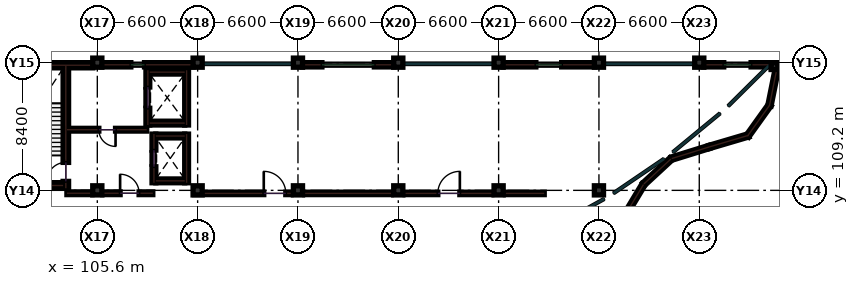
"""IFC4 building model, lengths in metres.
Left out: names, types, materials, properties, quantities, classifications, styles, units other than length and angle.
Written with IfcOpenShell. Run it as: python <this file> out.ifc"""

import sys

from ifc_helpers import new_model, si_unit, direction, frame, frame_2d, origin, origin_2d, place, context, subcontext, project, spatial, rectangle, extrude, element, fill, save


model = new_model("IFC4")
c1 = context("Model", 3, precision=1e-05, world=origin(), true_north=direction((0.0, 1.0)))
c2 = subcontext(c1, "Body", "Model", "MODEL_VIEW")
j1 = project(units=[si_unit("LENGTHUNIT", "METRE"), si_unit("PLANEANGLEUNIT", "RADIAN")], contexts=[c1])
p1 = place(None, origin())
s1 = spatial("IfcSite", under=j1, at=p1, CompositionType="ELEMENT")
p2 = place(p1, origin())
s2 = spatial("IfcBuilding", under=s1, at=p2, CompositionType="ELEMENT")
p3 = place(p2, frame((0.0, 0.0, 14.4)))
s3 = spatial("IfcBuildingStorey", under=s2, at=p3, CompositionType="ELEMENT", Elevation=14.4)
for number, where, z_axis, x_axis in (
    (1, (105.6, 109.2, 0.0), (0.0, 0.0, 1.0), (1.0, 0.0, 0.0)),
    (2, (105.6, 117.6, 0.0), (0.0, 0.0, 1.0), (1.0, 0.0, 0.0)),
    (3, (112.2, 109.2, 0.0), (0.0, 0.0, 1.0), (1.0, 0.0, 0.0)),
    (4, (112.2, 117.6, 0.0), (0.0, 0.0, 1.0), (1.0, 0.0, 0.0)),
    (5, (118.8, 109.2, 0.0), (0.0, 0.0, 1.0), (1.0, 0.0, 0.0)),
    (6, (118.8, 117.6, 0.0), (0.0, 0.0, 1.0), (1.0, 0.0, 0.0)),
    (7, (125.4, 109.2, 0.0), (0.0, 0.0, 1.0), (1.0, 0.0, 0.0)),
    (8, (125.4, 117.6, 0.0), (0.0, 0.0, 1.0), (1.0, 0.0, 0.0)),
    (9, (132.0, 109.2, 0.0), (0.0, 0.0, 1.0), (1.0, 0.0, 0.0)),
    (10, (132.0, 117.6, 0.0), (0.0, 0.0, 1.0), (1.0, 0.0, 0.0)),
    (11, (138.6, 109.2, 0.0), (0.0, 0.0, 1.0), (1.0, 0.0, 0.0)),
    (12, (138.6, 117.6, 0.0), (0.0, 0.0, 1.0), (1.0, 0.0, 0.0)),
    (13, (145.2, 117.6, 0.0), (0.0, 0.0, 1.0), (1.0, 0.0, 0.0)),
):
    element("IfcColumn", number, at=place(p3, frame(where, z_axis=z_axis, x_axis=x_axis)), inside=s3, PredefinedType="COLUMN", context=c2, shape_type="SweptSolid", body=[
        extrude(rectangle(XDim=0.6, YDim=0.6, at=origin_2d()), origin(), (0.0, 0.0, 1.0), 4.2),
    ])
p4 = place(p3, frame((150.15, 117.375, 0.0), z_axis=(0.0, 0.0, 1.0), x_axis=(1.0, 0.0, 0.0)))
e14 = element("IfcColumn", 14, at=p4, inside=s3, PredefinedType="COLUMN", context=c2, shape_type="SweptSolid", body=[
    extrude(rectangle(XDim=0.45, YDim=0.45, at=origin_2d()), origin(), (0.0, 0.0, 1.0), 4.2),
])
p5 = place(p3, frame((112.0, 109.0, 0.0), z_axis=(0.0, 0.0, 1.0), x_axis=(1.0, 0.0, 0.0)))
e15 = element("IfcWall", 15, at=p5, inside=s3, PredefinedType="PARTITIONING", context=c2, shape_type="SweptSolid", body=[
    extrude(rectangle(XDim=6.35, YDim=0.16, at=frame_2d((3.175, 0.0))), origin(), (0.0, 0.0, 1.0), 3.175),
])
p6 = place(p5, frame((4.55, 0.0, 0.0)))
e16 = element("IfcOpeningElement", 16, at=p6, cuts=e15, PredefinedType="OPENING", context=c2, shape_type="SweptSolid", body=[
    extrude(rectangle(XDim=1.45, YDim=2.25, at=frame_2d((0.725, 1.125))), frame((0.0, 0.09, 0.0), z_axis=(0.0, -1.0, 0.0), x_axis=(1.0, 0.0, 0.0)), (0.0, 0.0, 1.0), 0.18),
])
p7 = place(p3, frame((119.25, 109.0, 0.0), z_axis=(0.0, 0.0, 1.0), x_axis=(1.0, 0.0, 0.0)))
e17 = element("IfcWall", 17, at=p7, inside=s3, PredefinedType="PARTITIONING", context=c2, shape_type="SweptSolid", body=[
    extrude(rectangle(XDim=5.7, YDim=0.16, at=frame_2d((2.85, 0.0))), origin(), (0.0, 0.0, 1.0), 3.175),
])
p8 = place(p3, frame((125.85, 109.0, 0.0), z_axis=(0.0, 0.0, 1.0), x_axis=(1.0, 0.0, 0.0)))
e18 = element("IfcWall", 18, at=p8, inside=s3, PredefinedType="PARTITIONING", context=c2, shape_type="SweptSolid", body=[
    extrude(rectangle(XDim=5.7, YDim=0.16, at=frame_2d((2.85, 0.0))), origin(), (0.0, 0.0, 1.0), 3.175),
])
p9 = place(p8, frame((2.15, 0.0, 0.0)))
e19 = element("IfcOpeningElement", 19, at=p9, cuts=e18, PredefinedType="OPENING", context=c2, shape_type="SweptSolid", body=[
    extrude(rectangle(XDim=1.45, YDim=2.25, at=frame_2d((0.725, 1.125))), frame((0.0, 0.09, 0.0), z_axis=(0.0, -1.0, 0.0), x_axis=(1.0, 0.0, 0.0)), (0.0, 0.0, 1.0), 0.18),
])
p10 = place(p3, frame((132.45, 109.0, 0.0), z_axis=(0.0, 0.0, 1.0), x_axis=(1.0, 0.0, 0.0)))
e20 = element("IfcWall", 20, at=p10, inside=s3, PredefinedType="PARTITIONING", context=c2, shape_type="SweptSolid", body=[
    extrude(rectangle(XDim=2.55, YDim=0.16, at=frame_2d((1.275, 0.0))), origin(), (0.0, 0.0, 1.0), 3.175),
])
p11 = place(p3, frame((105.305, 117.43, 0.0), z_axis=(0.0, 0.0, 1.0), x_axis=(-1.0, 0.0, 0.0)))
e21 = element("IfcWall", 21, at=p11, inside=s3, PredefinedType="SHEAR", context=c2, shape_type="SweptSolid", body=[
    extrude(rectangle(XDim=6.01, YDim=0.34, at=frame_2d((3.005, 0.0))), origin(), (0.0, 0.0, 1.0), 3.94),
])
p12 = place(p3, frame((111.905, 117.46, 0.0), z_axis=(0.0, 0.0, 1.0), x_axis=(-1.0, 0.0, 0.0)))
e22 = element("IfcWall", 22, at=p12, inside=s3, PredefinedType="SOLIDWALL", context=c2, shape_type="SweptSolid", body=[
    extrude(rectangle(XDim=6.01, YDim=0.28, at=frame_2d((3.005, 0.0))), origin(), (0.0, 0.0, 1.0), 3.325),
])
p13 = place(p12, frame((3.2, 0.0, 0.95)))
e23 = element("IfcOpeningElement", 23, at=p13, cuts=e22, PredefinedType="OPENING", context=c2, shape_type="SweptSolid", body=[
    extrude(rectangle(XDim=0.9, YDim=1.4, at=frame_2d((0.45, 0.7))), frame((0.0, 0.15, 0.0), z_axis=(0.0, -1.0, 0.0), x_axis=(1.0, 0.0, 0.0)), (0.0, 0.0, 1.0), 0.3),
])
p14 = place(p3, frame((125.105, 117.46, 0.0), z_axis=(0.0, 0.0, 1.0), x_axis=(-1.0, 0.0, 0.0)))
e24 = element("IfcWall", 24, at=p14, inside=s3, PredefinedType="SOLIDWALL", context=c2, shape_type="SweptSolid", body=[
    extrude(rectangle(XDim=6.01, YDim=0.28, at=frame_2d((3.005, 0.0))), origin(), (0.0, 0.0, 1.0), 3.325),
])
p15 = place(p14, frame((1.28, 0.0, 0.95)))
e25 = element("IfcOpeningElement", 25, at=p15, cuts=e24, PredefinedType="OPENING", context=c2, shape_type="SweptSolid", body=[
    extrude(rectangle(XDim=3.45, YDim=1.7, at=frame_2d((1.725, 0.85))), frame((0.0, 0.15, 0.0), z_axis=(0.0, -1.0, 0.0), x_axis=(1.0, 0.0, 0.0)), (0.0, 0.0, 1.0), 0.3),
])
p16 = place(p3, frame((138.305, 117.46, 0.0), z_axis=(0.0, 0.0, 1.0), x_axis=(-1.0, 0.0, 0.0)))
e26 = element("IfcWall", 26, at=p16, inside=s3, PredefinedType="SOLIDWALL", context=c2, shape_type="SweptSolid", body=[
    extrude(rectangle(XDim=6.01, YDim=0.28, at=frame_2d((3.005, 0.0))), origin(), (0.0, 0.0, 1.0), 3.325),
])
p17 = place(p16, frame((2.155, 0.0, 0.95)))
e27 = element("IfcOpeningElement", 27, at=p17, cuts=e26, PredefinedType="OPENING", context=c2, shape_type="SweptSolid", body=[
    extrude(rectangle(XDim=1.7, YDim=1.95, at=frame_2d((0.85, 0.975))), frame((0.0, 0.15, 0.0), z_axis=(0.0, -1.0, 0.0), x_axis=(1.0, 0.0, 0.0)), (0.0, 0.0, 1.0), 0.3),
])
p18 = place(p3, frame((140.135, 107.265, 0.0), z_axis=(0.0, 0.0, 1.0), x_axis=(0.515304519221, 0.857007148436, 0.0)))
e28 = element("IfcWall", 28, at=p18, inside=s3, PredefinedType="SOLIDWALL", context=c2, shape_type="SweptSolid", body=[
    extrude(rectangle(XDim=2.707, YDim=0.22, at=frame_2d((1.354, 0.0))), origin(), (0.0, 0.0, 1.0), 1.45),
])
p19 = place(p3, frame((141.555, 109.62, 0.0), z_axis=(0.0, 0.0, 1.0), x_axis=(0.734536145401, 0.678569562462, 0.0)))
e29 = element("IfcWall", 29, at=p19, inside=s3, PredefinedType="SOLIDWALL", context=c2, shape_type="SweptSolid", body=[
    extrude(rectangle(XDim=2.417, YDim=0.22, at=frame_2d((1.208, 0.0))), origin(), (0.0, 0.0, 1.0), 1.45),
])
p20 = place(p3, frame((143.385, 111.29, 0.0), z_axis=(0.0, 0.0, 1.0), x_axis=(0.955244606325, 0.29581707538, 0.0)))
e30 = element("IfcWall", 30, at=p20, inside=s3, PredefinedType="SOLIDWALL", context=c2, shape_type="SweptSolid", body=[
    extrude(rectangle(XDim=2.586, YDim=0.22, at=frame_2d((1.293, 0.0))), origin(), (0.0, 0.0, 1.0), 1.45),
])
p21 = place(p3, frame((145.855, 112.055, 0.0), z_axis=(0.0, 0.0, 1.0), x_axis=(0.959029431028, 0.283306460255, 0.0)))
e31 = element("IfcWall", 31, at=p21, inside=s3, PredefinedType="SOLIDWALL", context=c2, shape_type="SweptSolid", body=[
    extrude(rectangle(XDim=2.701, YDim=0.22, at=frame_2d((1.35, 0.0))), origin(), (0.0, 0.0, 1.0), 1.45),
])
p22 = place(p3, frame((148.37, 112.765, 0.0), z_axis=(0.0, 0.0, 1.0), x_axis=(0.582720336681, 0.812672756537, 0.0)))
e32 = element("IfcWall", 32, at=p22, inside=s3, PredefinedType="SOLIDWALL", context=c2, shape_type="SweptSolid", body=[
    extrude(rectangle(XDim=2.523, YDim=0.22, at=frame_2d((1.261, 0.0))), origin(), (0.0, 0.0, 1.0), 1.45),
])
p23 = place(p3, frame((149.815, 114.76, 0.0), z_axis=(0.0, 0.0, 1.0), x_axis=(0.19684474065, 0.98043467303, 0.0)))
e33 = element("IfcWall", 33, at=p23, inside=s3, PredefinedType="SOLIDWALL", context=c2, shape_type="SweptSolid", body=[
    extrude(rectangle(XDim=2.642, YDim=0.22, at=frame_2d((1.321, 0.0))), origin(), (0.0, 0.0, 1.0), 1.45),
])
p24 = place(p3, frame((149.93, 117.46, 0.0), z_axis=(0.0, 0.0, 1.0), x_axis=(-1.0, 0.0, 0.0)))
e34 = element("IfcWall", 34, at=p24, inside=s3, PredefinedType="SOLIDWALL", context=c2, shape_type="SweptSolid", body=[
    extrude(rectangle(XDim=4.435, YDim=0.28, at=frame_2d((2.217, 0.0))), origin(), (0.0, 0.0, 1.0), 3.325),
])
p25 = place(p24, frame((1.32, 0.0, 0.95)))
e35 = element("IfcOpeningElement", 35, at=p25, cuts=e34, PredefinedType="OPENING", context=c2, shape_type="SweptSolid", body=[
    extrude(rectangle(XDim=1.8, YDim=1.6, at=frame_2d((0.9, 0.8))), frame((0.0, 0.15, 0.0), z_axis=(0.0, -1.0, 0.0), x_axis=(1.0, 0.0, 0.0)), (0.0, 0.0, 1.0), 0.3),
])
p26 = place(p3, frame((103.53, 109.34, 0.0), z_axis=(0.0, 0.0, 1.0), x_axis=(0.0, 1.0, 0.0)))
e36 = element("IfcWall", 36, at=p26, inside=s3, PredefinedType="SHEAR", context=c2, shape_type="SweptSolid", body=[
    extrude(rectangle(XDim=8.09, YDim=0.36, at=frame_2d((4.045, 0.0))), origin(), (0.0, 0.0, 1.0), 3.94),
])
p27 = place(p26, frame((0.45, 0.0, 0.0)))
e37 = element("IfcOpeningElement", 37, at=p27, cuts=e36, PredefinedType="OPENING", context=c2, shape_type="SweptSolid", body=[
    extrude(rectangle(XDim=1.25, YDim=2.15, at=frame_2d((0.625, 1.075))), frame((0.0, 0.19, 0.0), z_axis=(0.0, -1.0, 0.0), x_axis=(1.0, 0.0, 0.0)), (0.0, 0.0, 1.0), 0.38),
])
p28 = place(p3, frame((99.55, 109.52, 0.0), z_axis=(0.0, 0.0, 1.0), x_axis=(1.0, 0.0, 0.0)))
e38 = element("IfcWall", 38, at=p28, inside=s3, PredefinedType="SHEAR", context=c2, shape_type="SweptSolid", body=[
    extrude(rectangle(XDim=3.8, YDim=0.36, at=frame_2d((1.9, 0.0))), origin(), (0.0, 0.0, 1.0), 3.94),
])
p29 = place(p3, frame((109.325, 109.7, 0.0), z_axis=(0.0, 0.0, 1.0), x_axis=(0.0, 1.0, 0.0)))
e39 = element("IfcWall", 39, at=p29, inside=s3, PredefinedType="SHEAR", context=c2, shape_type="SweptSolid", body=[
    extrude(rectangle(XDim=3.2, YDim=0.25, at=frame_2d((1.6, 0.0))), origin(), (0.0, 0.0, 1.0), 3.94),
])
p30 = place(p29, frame((1.05, 0.0, 0.0)))
e40 = element("IfcOpeningElement", 40, at=p30, cuts=e39, PredefinedType="OPENING", context=c2, shape_type="SweptSolid", body=[
    extrude(rectangle(XDim=1.1, YDim=2.15, at=frame_2d((0.55, 1.075))), frame((0.0, 0.135, 0.0), z_axis=(0.0, -1.0, 0.0), x_axis=(1.0, 0.0, 0.0)), (0.0, 0.0, 1.0), 0.27),
])
p31 = place(p3, frame((111.475, 109.7, 0.0), z_axis=(0.0, 0.0, 1.0), x_axis=(0.0, 1.0, 0.0)))
e41 = element("IfcWall", 41, at=p31, inside=s3, PredefinedType="SHEAR", context=c2, shape_type="SweptSolid", body=[
    extrude(rectangle(XDim=3.2, YDim=0.25, at=frame_2d((1.6, 0.0))), origin(), (0.0, 0.0, 1.0), 3.94),
])
for number, where, z_axis, x_axis in (
    (42, (109.45, 109.825, 0.0), (0.0, 0.0, 1.0), (1.0, 0.0, 0.0)),
    (43, (109.45, 112.775, 0.0), (0.0, 0.0, 1.0), (1.0, 0.0, 0.0)),
):
    element("IfcWall", number, at=place(p3, frame(where, z_axis=z_axis, x_axis=x_axis)), inside=s3, PredefinedType="SHEAR", context=c2, shape_type="SweptSolid", body=[
        extrude(rectangle(XDim=1.9, YDim=0.25, at=frame_2d((0.95, 0.0))), origin(), (0.0, 0.0, 1.0), 3.94),
    ])
p32 = place(p3, frame((108.925, 113.5, 0.0), z_axis=(0.0, 0.0, 1.0), x_axis=(0.0, 1.0, 0.0)))
e44 = element("IfcWall", 44, at=p32, inside=s3, PredefinedType="SHEAR", context=c2, shape_type="SweptSolid", body=[
    extrude(rectangle(XDim=3.6, YDim=0.25, at=frame_2d((1.8, 0.0))), origin(), (0.0, 0.0, 1.0), 3.94),
])
p33 = place(p32, frame((1.1, 0.0, 0.0)))
e45 = element("IfcOpeningElement", 45, at=p33, cuts=e44, PredefinedType="OPENING", context=c2, shape_type="SweptSolid", body=[
    extrude(rectangle(XDim=1.4, YDim=2.2, at=frame_2d((0.7, 1.1))), frame((0.0, 0.135, 0.0), z_axis=(0.0, -1.0, 0.0), x_axis=(1.0, 0.0, 0.0)), (0.0, 0.0, 1.0), 0.27),
])
p34 = place(p3, frame((111.475, 113.5, 0.0), z_axis=(0.0, 0.0, 1.0), x_axis=(0.0, 1.0, 0.0)))
e46 = element("IfcWall", 46, at=p34, inside=s3, PredefinedType="SHEAR", context=c2, shape_type="SweptSolid", body=[
    extrude(rectangle(XDim=3.6, YDim=0.25, at=frame_2d((1.8, 0.0))), origin(), (0.0, 0.0, 1.0), 3.94),
])
for number, where, z_axis, x_axis in (
    (47, (109.05, 113.625, 0.0), (0.0, 0.0, 1.0), (1.0, 0.0, 0.0)),
    (48, (109.05, 116.975, 0.0), (0.0, 0.0, 1.0), (1.0, 0.0, 0.0)),
):
    element("IfcWall", number, at=place(p3, frame(where, z_axis=z_axis, x_axis=x_axis)), inside=s3, PredefinedType="SHEAR", context=c2, shape_type="SweptSolid", body=[
        extrude(rectangle(XDim=2.3, YDim=0.25, at=frame_2d((1.15, 0.0))), origin(), (0.0, 0.0, 1.0), 3.94),
    ])
p35 = place(p3, frame((103.6, 109.01, 0.0), z_axis=(0.0, 0.0, 1.0), x_axis=(1.0, 0.0, 0.0)))
e49 = element("IfcWall", 49, at=p35, inside=s3, PredefinedType="SOLIDWALL", context=c2, shape_type="SweptSolid", body=[
    extrude(rectangle(XDim=1.65, YDim=0.18, at=frame_2d((0.825, 0.0))), origin(), (0.0, 0.0, 1.0), 3.175),
])
p36 = place(p3, frame((105.95, 109.01, 0.0), z_axis=(0.0, 0.0, 1.0), x_axis=(1.0, 0.0, 0.0)))
e50 = element("IfcWall", 50, at=p36, inside=s3, PredefinedType="SOLIDWALL", context=c2, shape_type="SweptSolid", body=[
    extrude(rectangle(XDim=3.3, YDim=0.18, at=frame_2d((1.65, 0.0))), origin(), (0.0, 0.0, 1.0), 3.175),
])
p37 = place(p36, frame((1.15, 0.0, 0.0)))
e51 = element("IfcOpeningElement", 51, at=p37, cuts=e50, PredefinedType="OPENING", context=c2, shape_type="SweptSolid", body=[
    extrude(rectangle(XDim=1.25, YDim=2.15, at=frame_2d((0.625, 1.075))), frame((0.0, 0.1, 0.0), z_axis=(0.0, -1.0, 0.0), x_axis=(1.0, 0.0, 0.0)), (0.0, 0.0, 1.0), 0.2),
])
p38 = place(p3, frame((103.6, 113.19, 0.0), z_axis=(0.0, 0.0, 1.0), x_axis=(1.0, 0.0, 0.0)))
e52 = element("IfcWall", 52, at=p38, inside=s3, PredefinedType="SOLIDWALL", context=c2, shape_type="SweptSolid", body=[
    extrude(rectangle(XDim=5.25, YDim=0.18, at=frame_2d((2.625, 0.0))), origin(), (0.0, 0.0, 1.0), 3.94),
])
p39 = place(p38, frame((2.1, 0.0, 0.0)))
e53 = element("IfcOpeningElement", 53, at=p39, cuts=e52, PredefinedType="OPENING", context=c2, shape_type="SweptSolid", body=[
    extrude(rectangle(XDim=1.1, YDim=2.15, at=frame_2d((0.55, 1.075))), frame((0.0, 0.1, 0.0), z_axis=(0.0, -1.0, 0.0), x_axis=(1.0, 0.0, 0.0)), (0.0, 0.0, 1.0), 0.2),
])
p40 = place(p6, origin())
e54 = element("IfcDoor", 54, at=p40, inside=s3, OperationType="SINGLE_SWING_LEFT", PredefinedType="DOOR", context=c2, shape_type="SweptSolid", body=[
    extrude(rectangle(XDim=1.45, YDim=2.25, at=frame_2d((0.725, 1.125))), frame((0.0, 0.025, 0.0), z_axis=(0.0, -1.0, 0.0), x_axis=(1.0, 0.0, 0.0)), (0.0, 0.0, 1.0), 0.05),
])
fill(e16, e54)
p41 = place(p9, origin())
e55 = element("IfcDoor", 55, at=p41, inside=s3, OperationType="SINGLE_SWING_RIGHT", PredefinedType="DOOR", context=c2, shape_type="SweptSolid", body=[
    extrude(rectangle(XDim=1.45, YDim=2.25, at=frame_2d((0.725, 1.125))), frame((0.0, 0.025, 0.0), z_axis=(0.0, -1.0, 0.0), x_axis=(1.0, 0.0, 0.0)), (0.0, 0.0, 1.0), 0.05),
])
fill(e19, e55)
p42 = place(p13, origin())
e56 = element("IfcWindow", 56, at=p42, inside=s3, PartitioningType="SINGLE_PANEL", PredefinedType="WINDOW", context=c2, shape_type="SweptSolid", body=[
    extrude(rectangle(XDim=0.9, YDim=1.4, at=frame_2d((0.45, 0.7))), frame((0.0, 0.03, 0.0), z_axis=(0.0, -1.0, 0.0), x_axis=(1.0, 0.0, 0.0)), (0.0, 0.0, 1.0), 0.06),
])
fill(e23, e56)
p43 = place(p15, origin())
e57 = element("IfcWindow", 57, at=p43, inside=s3, PartitioningType="SINGLE_PANEL", PredefinedType="WINDOW", context=c2, shape_type="SweptSolid", body=[
    extrude(rectangle(XDim=3.45, YDim=1.7, at=frame_2d((1.725, 0.85))), frame((0.0, 0.03, 0.0), z_axis=(0.0, -1.0, 0.0), x_axis=(1.0, 0.0, 0.0)), (0.0, 0.0, 1.0), 0.06),
])
fill(e25, e57)
p44 = place(p17, origin())
e58 = element("IfcWindow", 58, at=p44, inside=s3, PartitioningType="SINGLE_PANEL", PredefinedType="WINDOW", context=c2, shape_type="SweptSolid", body=[
    extrude(rectangle(XDim=1.7, YDim=1.95, at=frame_2d((0.85, 0.975))), frame((0.0, 0.03, 0.0), z_axis=(0.0, -1.0, 0.0), x_axis=(1.0, 0.0, 0.0)), (0.0, 0.0, 1.0), 0.06),
])
fill(e27, e58)
p45 = place(p25, origin())
e59 = element("IfcWindow", 59, at=p45, inside=s3, PartitioningType="SINGLE_PANEL", PredefinedType="WINDOW", context=c2, shape_type="SweptSolid", body=[
    extrude(rectangle(XDim=1.8, YDim=1.6, at=frame_2d((0.9, 0.8))), frame((0.0, 0.03, 0.0), z_axis=(0.0, -1.0, 0.0), x_axis=(1.0, 0.0, 0.0)), (0.0, 0.0, 1.0), 0.06),
])
fill(e35, e59)
p46 = place(p27, origin())
e60 = element("IfcDoor", 60, at=p46, inside=s3, OperationType="SINGLE_SWING_LEFT", PredefinedType="DOOR", context=c2, shape_type="SweptSolid", body=[
    extrude(rectangle(XDim=1.25, YDim=2.15, at=frame_2d((0.625, 1.075))), frame((0.0, 0.025, 0.0), z_axis=(0.0, -1.0, 0.0), x_axis=(1.0, 0.0, 0.0)), (0.0, 0.0, 1.0), 0.05),
])
fill(e37, e60)
p47 = place(p30, origin())
e61 = element("IfcDoor", 61, at=p47, inside=s3, OperationType="SLIDING_TO_LEFT", PredefinedType="DOOR", context=c2, shape_type="SweptSolid", body=[
    extrude(rectangle(XDim=1.1, YDim=2.15, at=frame_2d((0.55, 1.075))), frame((0.0, 0.025, 0.0), z_axis=(0.0, -1.0, 0.0), x_axis=(1.0, 0.0, 0.0)), (0.0, 0.0, 1.0), 0.05),
])
fill(e40, e61)
p48 = place(p33, origin())
e62 = element("IfcDoor", 62, at=p48, inside=s3, OperationType="SLIDING_TO_LEFT", PredefinedType="DOOR", context=c2, shape_type="SweptSolid", body=[
    extrude(rectangle(XDim=1.4, YDim=2.2, at=frame_2d((0.7, 1.1))), frame((0.0, 0.025, 0.0), z_axis=(0.0, -1.0, 0.0), x_axis=(1.0, 0.0, 0.0)), (0.0, 0.0, 1.0), 0.05),
])
fill(e45, e62)
p49 = place(p37, origin())
e63 = element("IfcDoor", 63, at=p49, inside=s3, OperationType="SINGLE_SWING_LEFT", PredefinedType="DOOR", context=c2, shape_type="SweptSolid", body=[
    extrude(rectangle(XDim=1.25, YDim=2.15, at=frame_2d((0.625, 1.075))), frame((0.0, 0.025, 0.0), z_axis=(0.0, -1.0, 0.0), x_axis=(1.0, 0.0, 0.0)), (0.0, 0.0, 1.0), 0.05),
])
fill(e51, e63)
p50 = place(p39, frame((1.1, 0.0, 0.0), z_axis=(0.0, 0.0, 1.0), x_axis=(-1.0, 0.0, 0.0)))
e64 = element("IfcDoor", 64, at=p50, inside=s3, OperationType="SINGLE_SWING_RIGHT", PredefinedType="DOOR", context=c2, shape_type="SweptSolid", body=[
    extrude(rectangle(XDim=1.1, YDim=2.15, at=frame_2d((0.55, 1.075))), frame((0.0, 0.025, 0.0), z_axis=(0.0, -1.0, 0.0), x_axis=(1.0, 0.0, 0.0)), (0.0, 0.0, 1.0), 0.05),
])
fill(e53, e64)
save(model, sys.argv[1])
